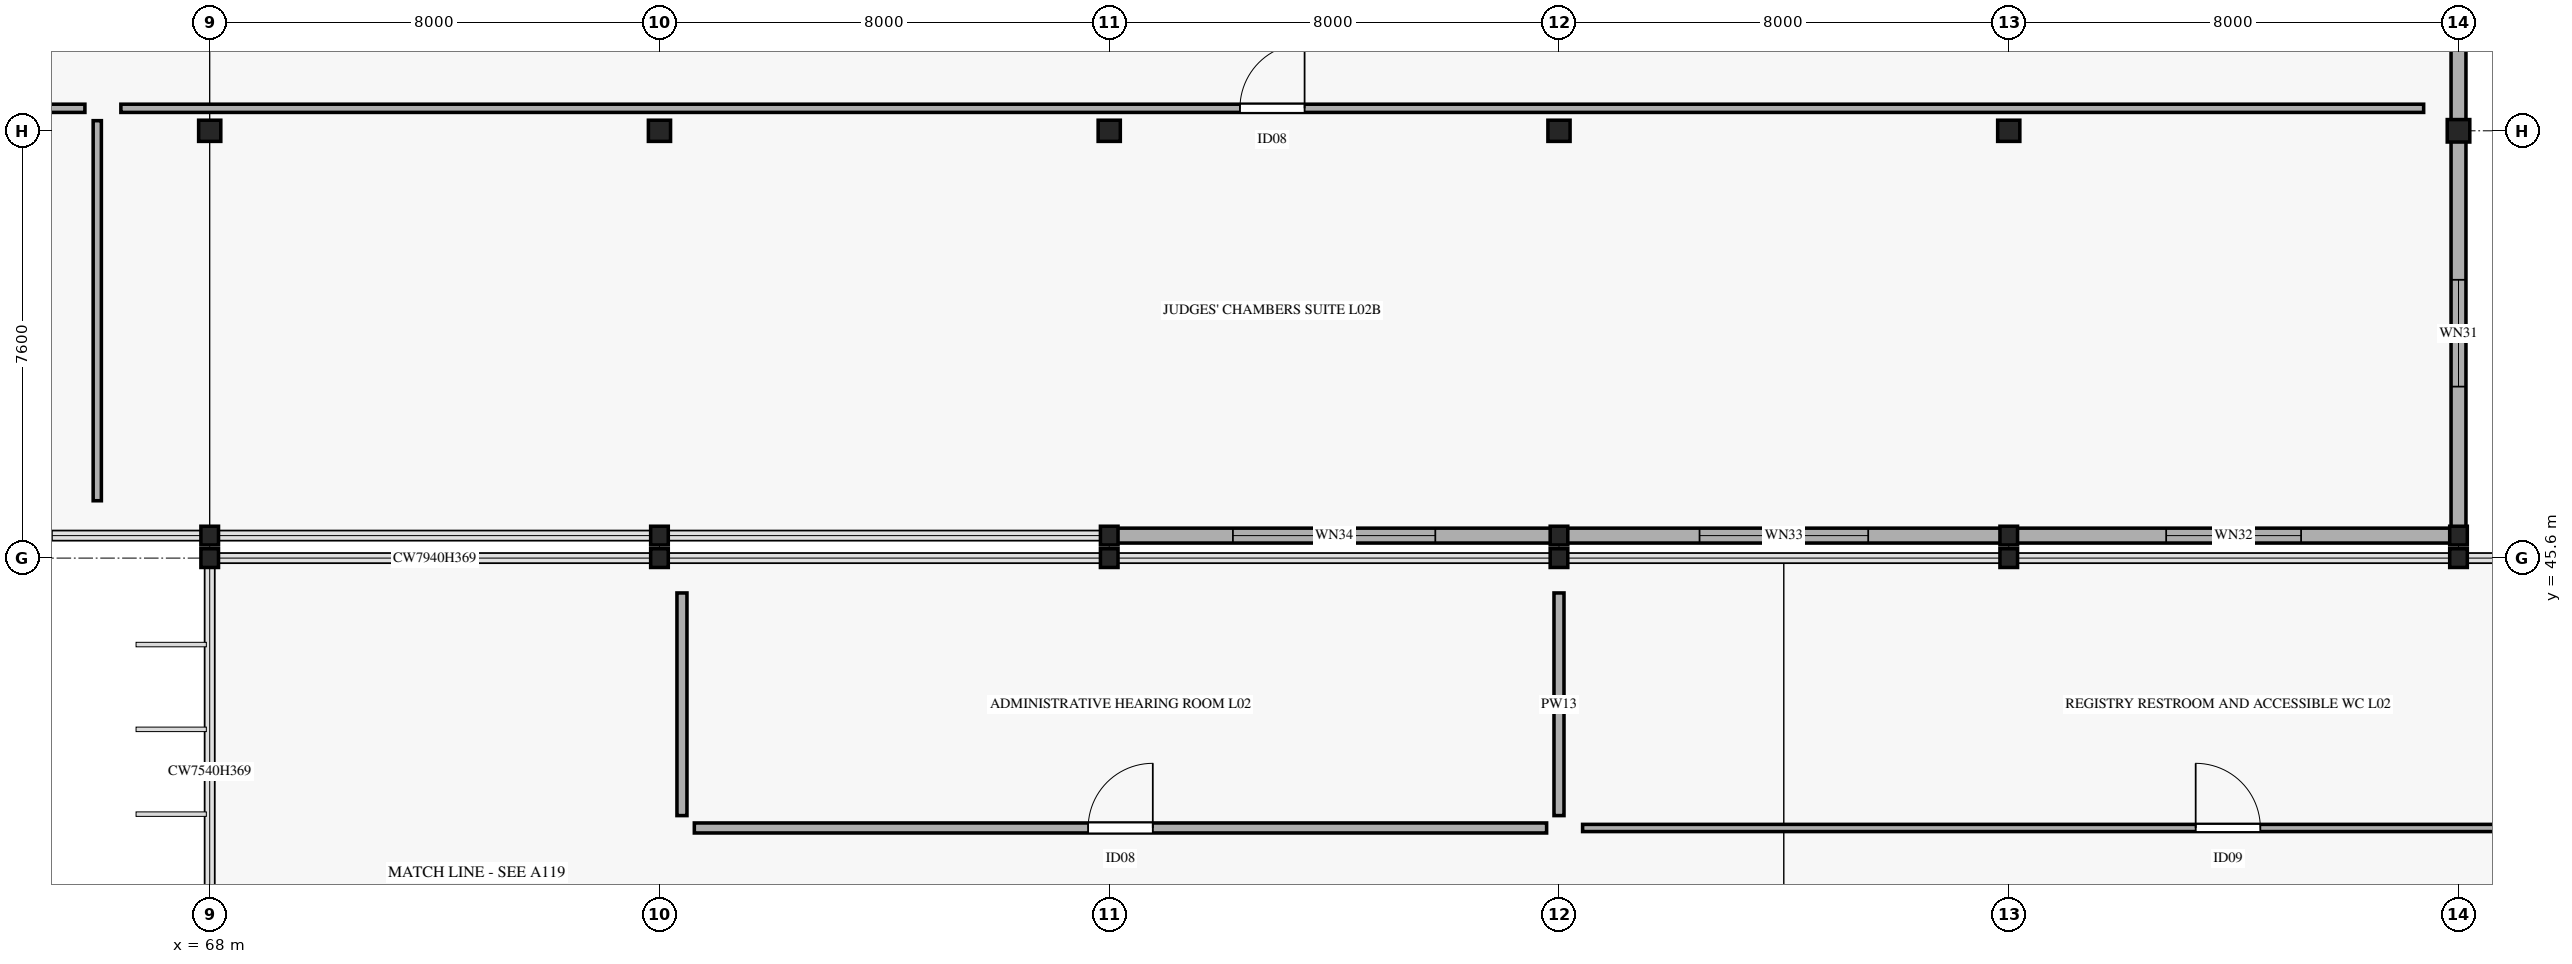
"""IFC4 building model, lengths in metres.
Left out: names, types, materials, properties, quantities, classifications, styles, units other than length and angle.
Written with IfcOpenShell. Run it as: python <this file> out.ifc"""

import sys

from ifc_helpers import new_model, si_unit, direction, frame, frame_2d, origin, origin_2d, place, context, subcontext, project, spatial, rectangle, i_section, extrude, element, fill, save


model = new_model("IFC4")
c1 = context("Model", 3, precision=1e-05, world=origin(), true_north=direction((0.0, 1.0)))
c2 = subcontext(c1, "Body", "Model", "MODEL_VIEW")
j1 = project(units=[si_unit("LENGTHUNIT", "METRE"), si_unit("PLANEANGLEUNIT", "RADIAN")], contexts=[c1])
p1 = place(None, origin())
s1 = spatial("IfcSite", under=j1, at=p1, CompositionType="ELEMENT")
p2 = place(p1, origin())
s2 = spatial("IfcBuilding", under=s1, at=p2, CompositionType="ELEMENT")
p3 = place(p2, frame((0.0, 0.0, 10.8)))
s3 = spatial("IfcBuildingStorey", under=s2, at=p3, CompositionType="ELEMENT", Elevation=10.8)
for number, where, z_axis, x_axis in (
    (1, (68.0, 45.6, 0.0), (0.0, 0.0, 1.0), (1.0, 0.0, 0.0)),
    (2, (76.0, 45.6, 0.0), (0.0, 0.0, 1.0), (1.0, 0.0, 0.0)),
    (3, (84.0, 45.6, 0.0), (0.0, 0.0, 1.0), (1.0, 0.0, 0.0)),
    (4, (92.0, 45.6, 0.0), (0.0, 0.0, 1.0), (1.0, 0.0, 0.0)),
    (5, (100.0, 45.6, 0.0), (0.0, 0.0, 1.0), (1.0, 0.0, 0.0)),
    (6, (108.0, 45.6, 0.0), (0.0, 0.0, 1.0), (1.0, 0.0, 0.0)),
    (7, (68.0, 46.0, 0.0), (0.0, 0.0, 1.0), (1.0, 0.0, 0.0)),
):
    element("IfcColumn", number, at=place(p3, frame(where, z_axis=z_axis, x_axis=x_axis)), inside=s3, PredefinedType="COLUMN", context=c2, shape_type="SweptSolid", body=[
        extrude(i_section(OverallWidth=0.313, OverallDepth=0.333, WebThickness=0.018, FlangeThickness=0.028, FilletRadius=0.015, at=origin_2d()), origin(), (0.0, 0.0, 1.0), 4.59),
    ])
p4 = place(p3, frame((68.0, 53.2, 0.0), z_axis=(0.0, 0.0, 1.0), x_axis=(1.0, 0.0, 0.0)))
e8 = element("IfcColumn", 8, at=p4, inside=s3, PredefinedType="COLUMN", context=c2, shape_type="SweptSolid", body=[
    extrude(i_section(OverallWidth=0.394, OverallDepth=0.376, WebThickness=0.017, FlangeThickness=0.028, FilletRadius=0.015, at=origin_2d()), origin(), (0.0, 0.0, 1.0), 4.59),
])
p5 = place(p3, frame((76.0, 46.0, 0.0), z_axis=(0.0, 0.0, 1.0), x_axis=(1.0, 0.0, 0.0)))
e9 = element("IfcColumn", 9, at=p5, inside=s3, PredefinedType="COLUMN", context=c2, shape_type="SweptSolid", body=[
    extrude(i_section(OverallWidth=0.313, OverallDepth=0.333, WebThickness=0.018, FlangeThickness=0.028, FilletRadius=0.015, at=origin_2d()), origin(), (0.0, 0.0, 1.0), 4.59),
])
p6 = place(p3, frame((76.0, 53.2, 0.0), z_axis=(0.0, 0.0, 1.0), x_axis=(1.0, 0.0, 0.0)))
e10 = element("IfcColumn", 10, at=p6, inside=s3, PredefinedType="COLUMN", context=c2, shape_type="SweptSolid", body=[
    extrude(i_section(OverallWidth=0.394, OverallDepth=0.376, WebThickness=0.017, FlangeThickness=0.028, FilletRadius=0.015, at=origin_2d()), origin(), (0.0, 0.0, 1.0), 4.59),
])
p7 = place(p3, frame((84.0, 46.0, 0.0), z_axis=(0.0, 0.0, 1.0), x_axis=(1.0, 0.0, 0.0)))
e11 = element("IfcColumn", 11, at=p7, inside=s3, PredefinedType="COLUMN", context=c2, shape_type="SweptSolid", body=[
    extrude(i_section(OverallWidth=0.313, OverallDepth=0.333, WebThickness=0.018, FlangeThickness=0.028, FilletRadius=0.015, at=origin_2d()), origin(), (0.0, 0.0, 1.0), 4.59),
])
p8 = place(p3, frame((84.0, 53.2, 0.0), z_axis=(0.0, 0.0, 1.0), x_axis=(1.0, 0.0, 0.0)))
e12 = element("IfcColumn", 12, at=p8, inside=s3, PredefinedType="COLUMN", context=c2, shape_type="SweptSolid", body=[
    extrude(i_section(OverallWidth=0.394, OverallDepth=0.376, WebThickness=0.017, FlangeThickness=0.028, FilletRadius=0.015, at=origin_2d()), origin(), (0.0, 0.0, 1.0), 4.59),
])
p9 = place(p3, frame((92.0, 46.0, 0.0), z_axis=(0.0, 0.0, 1.0), x_axis=(1.0, 0.0, 0.0)))
e13 = element("IfcColumn", 13, at=p9, inside=s3, PredefinedType="COLUMN", context=c2, shape_type="SweptSolid", body=[
    extrude(i_section(OverallWidth=0.313, OverallDepth=0.333, WebThickness=0.018, FlangeThickness=0.028, FilletRadius=0.015, at=origin_2d()), origin(), (0.0, 0.0, 1.0), 4.59),
])
p10 = place(p3, frame((92.0, 53.2, 0.0), z_axis=(0.0, 0.0, 1.0), x_axis=(1.0, 0.0, 0.0)))
e14 = element("IfcColumn", 14, at=p10, inside=s3, PredefinedType="COLUMN", context=c2, shape_type="SweptSolid", body=[
    extrude(i_section(OverallWidth=0.394, OverallDepth=0.376, WebThickness=0.017, FlangeThickness=0.028, FilletRadius=0.015, at=origin_2d()), origin(), (0.0, 0.0, 1.0), 4.59),
])
p11 = place(p3, frame((100.0, 46.0, 0.0), z_axis=(0.0, 0.0, 1.0), x_axis=(1.0, 0.0, 0.0)))
e15 = element("IfcColumn", 15, at=p11, inside=s3, PredefinedType="COLUMN", context=c2, shape_type="SweptSolid", body=[
    extrude(i_section(OverallWidth=0.313, OverallDepth=0.333, WebThickness=0.018, FlangeThickness=0.028, FilletRadius=0.015, at=origin_2d()), origin(), (0.0, 0.0, 1.0), 4.59),
])
p12 = place(p3, frame((100.0, 53.2, 0.0), z_axis=(0.0, 0.0, 1.0), x_axis=(1.0, 0.0, 0.0)))
e16 = element("IfcColumn", 16, at=p12, inside=s3, PredefinedType="COLUMN", context=c2, shape_type="SweptSolid", body=[
    extrude(i_section(OverallWidth=0.394, OverallDepth=0.376, WebThickness=0.017, FlangeThickness=0.028, FilletRadius=0.015, at=origin_2d()), origin(), (0.0, 0.0, 1.0), 4.59),
])
p13 = place(p3, frame((108.0, 46.0, 0.0), z_axis=(0.0, 0.0, 1.0), x_axis=(1.0, 0.0, 0.0)))
e17 = element("IfcColumn", 17, at=p13, inside=s3, PredefinedType="COLUMN", context=c2, shape_type="SweptSolid", body=[
    extrude(i_section(OverallWidth=0.313, OverallDepth=0.333, WebThickness=0.018, FlangeThickness=0.028, FilletRadius=0.015, at=origin_2d()), origin(), (0.0, 0.0, 1.0), 4.59),
])
p14 = place(p3, frame((108.0, 53.2, 0.0), z_axis=(0.0, 0.0, 1.0), x_axis=(1.0, 0.0, 0.0)))
e18 = element("IfcColumn", 18, at=p14, inside=s3, PredefinedType="COLUMN", context=c2, shape_type="SweptSolid", body=[
    extrude(i_section(OverallWidth=0.401, OverallDepth=0.399, WebThickness=0.025, FlangeThickness=0.04, FilletRadius=0.015, at=origin_2d()), origin(), (0.0, 0.0, 1.0), 4.59),
])
p15 = place(p3, frame((108.0, 60.82, 0.0), z_axis=(0.0, 0.0, 1.0), x_axis=(0.0, -1.0, 0.0)))
e19 = element("IfcWall", 19, at=p15, inside=s3, PredefinedType="STANDARD", context=c2, shape_type="SweptSolid", body=[
    extrude(rectangle(XDim=7.64, YDim=0.265, at=frame_2d((3.82, 0.0))), origin(), (0.0, 0.0, 1.0), 3.66),
])
p16 = place(p15, frame((3.07, 0.0, 0.75)))
e20 = element("IfcOpeningElement", 20, at=p16, cuts=e19, PredefinedType="OPENING", context=c2, shape_type="SweptSolid", body=[
    extrude(rectangle(XDim=1.5, YDim=1.3, at=frame_2d((0.75, 0.65))), frame((0.0, 0.142, 0.0), z_axis=(0.0, -1.0, 0.0), x_axis=(1.0, 0.0, 0.0)), (0.0, 0.0, 1.0), 0.285),
])
p17 = place(p3, frame((108.0, 53.22, 0.0), z_axis=(0.0, 0.0, 1.0), x_axis=(0.0, -1.0, 0.0)))
e21 = element("IfcWall", 21, at=p17, inside=s3, PredefinedType="STANDARD", context=c2, shape_type="SweptSolid", body=[
    extrude(rectangle(XDim=7.24, YDim=0.265, at=frame_2d((3.62, 0.0))), origin(), (0.0, 0.0, 1.0), 3.66),
])
p18 = place(p17, frame((2.67, 0.0, 0.75)))
e22 = element("IfcOpeningElement", 22, at=p18, cuts=e21, PredefinedType="OPENING", context=c2, shape_type="SweptSolid", body=[
    extrude(rectangle(XDim=1.9, YDim=1.3, at=frame_2d((0.95, 0.65))), frame((0.0, 0.142, 0.0), z_axis=(0.0, -1.0, 0.0), x_axis=(1.0, 0.0, 0.0)), (0.0, 0.0, 1.0), 0.285),
])
p19 = place(p3, frame((108.02, 46.0, 0.0), z_axis=(0.0, 0.0, 1.0), x_axis=(-1.0, 0.0, 0.0)))
e23 = element("IfcWall", 23, at=p19, inside=s3, PredefinedType="STANDARD", context=c2, shape_type="SweptSolid", body=[
    extrude(rectangle(XDim=8.04, YDim=0.265, at=frame_2d((4.02, 0.0))), origin(), (0.0, 0.0, 1.0), 3.66),
])
p20 = place(p19, frame((2.82, 0.0, 0.75)))
e24 = element("IfcOpeningElement", 24, at=p20, cuts=e23, PredefinedType="OPENING", context=c2, shape_type="SweptSolid", body=[
    extrude(rectangle(XDim=2.4, YDim=1.3, at=frame_2d((1.2, 0.65))), frame((0.0, 0.142, 0.0), z_axis=(0.0, -1.0, 0.0), x_axis=(1.0, 0.0, 0.0)), (0.0, 0.0, 1.0), 0.285),
])
p21 = place(p3, frame((100.02, 46.0, 0.0), z_axis=(0.0, 0.0, 1.0), x_axis=(-1.0, 0.0, 0.0)))
e25 = element("IfcWall", 25, at=p21, inside=s3, PredefinedType="STANDARD", context=c2, shape_type="SweptSolid", body=[
    extrude(rectangle(XDim=8.04, YDim=0.265, at=frame_2d((4.02, 0.0))), origin(), (0.0, 0.0, 1.0), 3.66),
])
p22 = place(p21, frame((2.52, 0.0, 0.75)))
e26 = element("IfcOpeningElement", 26, at=p22, cuts=e25, PredefinedType="OPENING", context=c2, shape_type="SweptSolid", body=[
    extrude(rectangle(XDim=3.0, YDim=1.3, at=frame_2d((1.5, 0.65))), frame((0.0, 0.142, 0.0), z_axis=(0.0, -1.0, 0.0), x_axis=(1.0, 0.0, 0.0)), (0.0, 0.0, 1.0), 0.285),
])
p23 = place(p3, frame((92.02, 46.0, 0.0), z_axis=(0.0, 0.0, 1.0), x_axis=(-1.0, 0.0, 0.0)))
e27 = element("IfcWall", 27, at=p23, inside=s3, PredefinedType="STANDARD", context=c2, shape_type="SweptSolid", body=[
    extrude(rectangle(XDim=8.04, YDim=0.265, at=frame_2d((4.02, 0.0))), origin(), (0.0, 0.0, 1.0), 3.66),
])
p24 = place(p23, frame((2.22, 0.0, 0.75)))
e28 = element("IfcOpeningElement", 28, at=p24, cuts=e27, PredefinedType="OPENING", context=c2, shape_type="SweptSolid", body=[
    extrude(rectangle(XDim=3.6, YDim=1.3, at=frame_2d((1.8, 0.65))), frame((0.0, 0.142, 0.0), z_axis=(0.0, -1.0, 0.0), x_axis=(1.0, 0.0, 0.0)), (0.0, 0.0, 1.0), 0.285),
])
p25 = place(p3, frame((76.62, 40.8, 0.0), z_axis=(0.0, 0.0, 1.0), x_axis=(1.0, 0.0, 0.0)))
e29 = element("IfcWall", 29, at=p25, inside=s3, PredefinedType="PARTITIONING", context=c2, shape_type="SweptSolid", body=[
    extrude(rectangle(XDim=15.16, YDim=0.178, at=frame_2d((7.58, 0.0))), origin(), (0.0, 0.0, 1.0), 3.45),
])
p26 = place(p25, frame((7.005, 0.0, 0.0)))
e30 = element("IfcOpeningElement", 30, at=p26, cuts=e29, PredefinedType="OPENING", context=c2, shape_type="SweptSolid", body=[
    extrude(rectangle(XDim=1.15, YDim=2.2, at=frame_2d((0.575, 1.1))), frame((0.0, 0.099, 0.0), z_axis=(0.0, -1.0, 0.0), x_axis=(1.0, 0.0, 0.0)), (0.0, 0.0, 1.0), 0.198),
])
for number, where, z_axis, x_axis in (
    (31, (92.0, 41.02, 0.0), (0.0, 0.0, 1.0), (0.0, 1.0, 0.0)),
    (32, (76.4, 41.02, 0.0), (0.0, 0.0, 1.0), (0.0, 1.0, 0.0)),
):
    element("IfcWall", number, at=place(p3, frame(where, z_axis=z_axis, x_axis=x_axis)), inside=s3, PredefinedType="PARTITIONING", context=c2, shape_type="SweptSolid", body=[
        extrude(rectangle(XDim=3.96, YDim=0.178, at=frame_2d((1.98, 0.0))), origin(), (0.0, 0.0, 1.0), 3.45),
    ])
p27 = place(p3, frame((92.42, 40.8, 0.0), z_axis=(0.0, 0.0, 1.0), x_axis=(1.0, 0.0, 0.0)))
e33 = element("IfcWall", 33, at=p27, inside=s3, PredefinedType="PARTITIONING", context=c2, shape_type="SweptSolid", body=[
    extrude(rectangle(XDim=22.96, YDim=0.128, at=frame_2d((11.48, 0.0))), origin(), (0.0, 0.0, 1.0), 3.45),
])
p28 = place(p27, frame((10.905, 0.0, 0.0)))
e34 = element("IfcOpeningElement", 34, at=p28, cuts=e33, PredefinedType="OPENING", context=c2, shape_type="SweptSolid", body=[
    extrude(rectangle(XDim=1.15, YDim=2.15, at=frame_2d((0.575, 1.075))), frame((0.0, 0.074, 0.0), z_axis=(0.0, -1.0, 0.0), x_axis=(1.0, 0.0, 0.0)), (0.0, 0.0, 1.0), 0.148),
])
p29 = place(p3, frame((31.82, 53.6, 0.0), z_axis=(0.0, 0.0, 1.0), x_axis=(1.0, 0.0, 0.0)))
e35 = element("IfcWall", 35, at=p29, inside=s3, PredefinedType="PARTITIONING", context=c2, shape_type="SweptSolid", body=[
    extrude(rectangle(XDim=33.96, YDim=0.146, at=frame_2d((16.98, 0.0))), origin(), (0.0, 0.0, 1.0), 3.45),
])
p30 = place(p29, frame((16.38, 0.0, 0.0)))
e36 = element("IfcOpeningElement", 36, at=p30, cuts=e35, PredefinedType="OPENING", context=c2, shape_type="SweptSolid", body=[
    extrude(rectangle(XDim=1.2, YDim=2.2, at=frame_2d((0.6, 1.1))), frame((0.0, 0.083, 0.0), z_axis=(0.0, -1.0, 0.0), x_axis=(1.0, 0.0, 0.0)), (0.0, 0.0, 1.0), 0.166),
])
p31 = place(p3, frame((66.0, 46.62, 0.0), z_axis=(0.0, 0.0, 1.0), x_axis=(0.0, 1.0, 0.0)))
e37 = element("IfcWall", 37, at=p31, inside=s3, PredefinedType="PARTITIONING", context=c2, shape_type="SweptSolid", body=[
    extrude(rectangle(XDim=6.76, YDim=0.146, at=frame_2d((3.38, 0.0))), origin(), (0.0, 0.0, 1.0), 3.45),
])
p32 = place(p3, frame((66.42, 53.6, 0.0), z_axis=(0.0, 0.0, 1.0), x_axis=(1.0, 0.0, 0.0)))
e38 = element("IfcWall", 38, at=p32, inside=s3, PredefinedType="PARTITIONING", context=c2, shape_type="SweptSolid", body=[
    extrude(rectangle(XDim=40.96, YDim=0.146, at=frame_2d((20.48, 0.0))), origin(), (0.0, 0.0, 1.0), 3.45),
])
p33 = place(p32, frame((19.905, 0.0, 0.0)))
e39 = element("IfcOpeningElement", 39, at=p33, cuts=e38, PredefinedType="OPENING", context=c2, shape_type="SweptSolid", body=[
    extrude(rectangle(XDim=1.15, YDim=2.2, at=frame_2d((0.575, 1.1))), frame((0.0, 0.083, 0.0), z_axis=(0.0, -1.0, 0.0), x_axis=(1.0, 0.0, 0.0)), (0.0, 0.0, 1.0), 0.166),
])
p34 = place(p18, origin())
e40 = element("IfcWindow", 40, at=p34, inside=s3, PartitioningType="SINGLE_PANEL", PredefinedType="WINDOW", context=c2, shape_type="SweptSolid", body=[
    extrude(rectangle(XDim=1.9, YDim=1.3, at=frame_2d((0.95, 0.65))), frame((0.0, 0.03, 0.0), z_axis=(0.0, -1.0, 0.0), x_axis=(1.0, 0.0, 0.0)), (0.0, 0.0, 1.0), 0.06),
])
fill(e22, e40)
p35 = place(p20, origin())
e41 = element("IfcWindow", 41, at=p35, inside=s3, PartitioningType="SINGLE_PANEL", PredefinedType="WINDOW", context=c2, shape_type="SweptSolid", body=[
    extrude(rectangle(XDim=2.4, YDim=1.3, at=frame_2d((1.2, 0.65))), frame((0.0, 0.03, 0.0), z_axis=(0.0, -1.0, 0.0), x_axis=(1.0, 0.0, 0.0)), (0.0, 0.0, 1.0), 0.06),
])
fill(e24, e41)
p36 = place(p22, origin())
e42 = element("IfcWindow", 42, at=p36, inside=s3, PartitioningType="SINGLE_PANEL", PredefinedType="WINDOW", context=c2, shape_type="SweptSolid", body=[
    extrude(rectangle(XDim=3.0, YDim=1.3, at=frame_2d((1.5, 0.65))), frame((0.0, 0.03, 0.0), z_axis=(0.0, -1.0, 0.0), x_axis=(1.0, 0.0, 0.0)), (0.0, 0.0, 1.0), 0.06),
])
fill(e26, e42)
p37 = place(p24, origin())
e43 = element("IfcWindow", 43, at=p37, inside=s3, PartitioningType="SINGLE_PANEL", PredefinedType="WINDOW", context=c2, shape_type="SweptSolid", body=[
    extrude(rectangle(XDim=3.6, YDim=1.3, at=frame_2d((1.8, 0.65))), frame((0.0, 0.03, 0.0), z_axis=(0.0, -1.0, 0.0), x_axis=(1.0, 0.0, 0.0)), (0.0, 0.0, 1.0), 0.06),
])
fill(e28, e43)
p38 = place(p26, origin())
e44 = element("IfcDoor", 44, at=p38, inside=s3, OperationType="SINGLE_SWING_RIGHT", PredefinedType="DOOR", context=c2, shape_type="SweptSolid", body=[
    extrude(rectangle(XDim=1.15, YDim=2.2, at=frame_2d((0.575, 1.1))), frame((0.0, 0.025, 0.0), z_axis=(0.0, -1.0, 0.0), x_axis=(1.0, 0.0, 0.0)), (0.0, 0.0, 1.0), 0.05),
])
fill(e30, e44)
p39 = place(p28, origin())
e45 = element("IfcDoor", 45, at=p39, inside=s3, OperationType="SINGLE_SWING_LEFT", PredefinedType="DOOR", context=c2, shape_type="SweptSolid", body=[
    extrude(rectangle(XDim=1.15, YDim=2.15, at=frame_2d((0.575, 1.075))), frame((0.0, 0.025, 0.0), z_axis=(0.0, -1.0, 0.0), x_axis=(1.0, 0.0, 0.0)), (0.0, 0.0, 1.0), 0.05),
])
fill(e34, e45)
p40 = place(p33, origin())
e46 = element("IfcDoor", 46, at=p40, inside=s3, OperationType="SINGLE_SWING_RIGHT", PredefinedType="DOOR", context=c2, shape_type="SweptSolid", body=[
    extrude(rectangle(XDim=1.15, YDim=2.2, at=frame_2d((0.575, 1.1))), frame((0.0, 0.025, 0.0), z_axis=(0.0, -1.0, 0.0), x_axis=(1.0, 0.0, 0.0)), (0.0, 0.0, 1.0), 0.05),
])
fill(e39, e46)
save(model, sys.argv[1])
